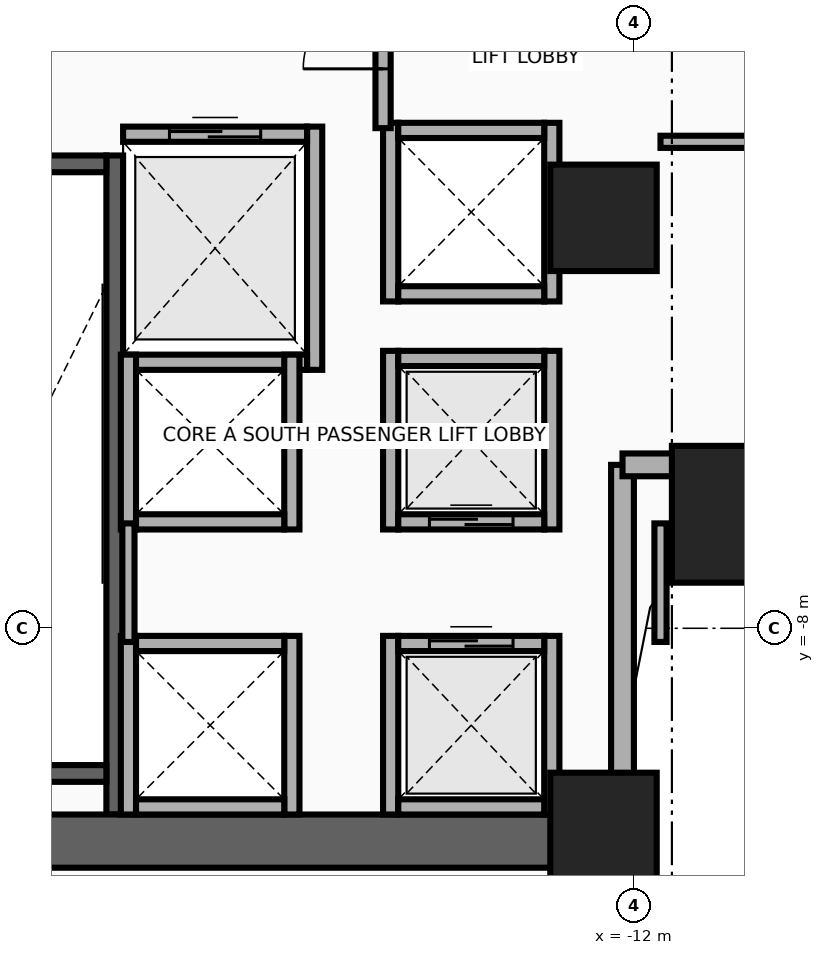
"""IFC4 building model, lengths in metres.
Left out: names, types, materials, properties, quantities, classifications, styles, units other than length and angle.
Written with IfcOpenShell. Run it as: python <this file> out.ifc"""

import sys

from ifc_helpers import new_model, si_unit, direction, frame, frame_2d, origin, origin_2d, place, context, subcontext, project, spatial, rectangle, extrude, source, transform, mapped, element, fill, save


model = new_model("IFC4")
c1 = context("Model", 3, precision=1e-05, world=origin(), true_north=direction((0.0, 1.0)))
c2 = subcontext(c1, "Body", "Model", "MODEL_VIEW")
j1 = project(units=[si_unit("LENGTHUNIT", "METRE"), si_unit("PLANEANGLEUNIT", "RADIAN")], contexts=[c1])
p1 = place(None, origin())
s1 = spatial("IfcSite", under=j1, at=p1, CompositionType="ELEMENT")
p2 = place(p1, origin())
s2 = spatial("IfcBuilding", under=s1, at=p2, CompositionType="ELEMENT")
p3 = place(p2, frame((0.0, 0.0, 10.4)))
s3 = spatial("IfcBuildingStorey", under=s2, at=p3, CompositionType="ELEMENT", Elevation=10.4)
p4 = place(p3, frame((-18.83, -10.45, 0.0), z_axis=(0.0, 0.0, 1.0), x_axis=(0.0, 1.0, 0.0)))
e1 = element("IfcWall", 1, at=p4, inside=s3, PredefinedType="SHEAR", context=c2, shape_type="SweptSolid", body=[
    extrude(rectangle(XDim=8.67, YDim=0.22, at=frame_2d((4.335, 0.0))), origin(), (0.0, 0.0, 1.0), 4.92),
])
p5 = place(p3, frame((-22.05, -9.91, 0.0), z_axis=(0.0, 0.0, 1.0), x_axis=(1.0, 0.0, 0.0)))
e2 = element("IfcWall", 2, at=p5, inside=s3, PredefinedType="SHEAR", context=c2, shape_type="SweptSolid", body=[
    extrude(rectangle(XDim=3.11, YDim=0.22, at=frame_2d((1.555, 0.0))), origin(), (0.0, 0.0, 1.0), 4.92),
])
p6 = place(p3, frame((-22.05, -1.89, 0.0), z_axis=(0.0, 0.0, 1.0), x_axis=(1.0, 0.0, 0.0)))
e3 = element("IfcWall", 3, at=p6, inside=s3, PredefinedType="SHEAR", context=c2, shape_type="SweptSolid", body=[
    extrude(rectangle(XDim=3.11, YDim=0.22, at=frame_2d((1.555, 0.0))), origin(), (0.0, 0.0, 1.0), 4.92),
])
p7 = place(p6, frame((1.0, 0.0, 0.0)))
e4 = element("IfcOpeningElement", 4, at=p7, cuts=e3, PredefinedType="OPENING", context=c2, shape_type="SweptSolid", body=[
    extrude(rectangle(XDim=1.1, YDim=2.15, at=frame_2d((0.55, 1.075))), frame((0.0, 0.125, 0.0), z_axis=(0.0, -1.0, 0.0), x_axis=(1.0, 0.0, 0.0)), (0.0, 0.0, 1.0), 0.25),
])
p8 = place(p3, frame((-22.65, -10.8, 0.0), z_axis=(0.0, 0.0, 1.0), x_axis=(1.0, 0.0, 0.0)))
e5 = element("IfcWall", 5, at=p8, inside=s3, PredefinedType="SHEAR", context=c2, shape_type="SweptSolid", body=[
    extrude(rectangle(XDim=10.25, YDim=0.7, at=frame_2d((5.125, 0.0))), origin(), (0.0, 0.0, 1.0), 4.92),
])
m1 = source(origin(), c2, "Body", "SweptSolid", [
    extrude(rectangle(XDim=1.4, YDim=1.4, at=origin_2d()), origin(), (0.0, 0.0, 1.0), 5.2),
])
for number, where, z_axis, x_axis in (
    (6, (-12.4, -10.6, 0.0), (0.0, 0.0, 1.0), (1.0, 0.0, 0.0)),
    (7, (-12.4, -2.6, 0.0), (0.0, 0.0, 1.0), (1.0, 0.0, 0.0)),
):
    element("IfcColumn", number, at=place(p3, frame(where, z_axis=z_axis, x_axis=x_axis)), inside=s3, PredefinedType="COLUMN", context=c2, shape_type="MappedRepresentation", body=[
        mapped(m1, transform((0.0, 0.0, 0.0), x_axis=(1.0, 0.0, 0.0), y_axis=(0.0, 1.0, 0.0), z_axis=(0.0, 0.0, 1.0), scale=1.0)),
    ])
m2 = source(origin(), c2, "Body", "SweptSolid", [
    extrude(rectangle(XDim=1.8, YDim=1.8, at=origin_2d()), origin(), (0.0, 0.0, 1.0), 5.2),
])
p9 = place(p3, frame((-10.6, -6.5, 0.0), z_axis=(0.0, 0.0, 1.0), x_axis=(1.0, 0.0, 0.0)))
e8 = element("IfcColumn", 8, at=p9, inside=s3, PredefinedType="COLUMN", context=c2, shape_type="MappedRepresentation", body=[
    mapped(m2, transform((0.0, 0.0, 0.0), x_axis=(1.0, 0.0, 0.0), y_axis=(0.0, 1.0, 0.0), z_axis=(0.0, 0.0, 1.0), scale=1.0)),
])
p10 = place(p3, frame((-12.15, -22.85, 0.0), z_axis=(0.0, 0.0, 1.0), x_axis=(0.0, 1.0, 0.0)))
e9 = element("IfcWall", 9, at=p10, inside=s3, PredefinedType="SOLIDWALL", context=c2, shape_type="SweptSolid", body=[
    extrude(rectangle(XDim=17.0, YDim=0.3, at=frame_2d((8.5, 0.0))), origin(), (0.0, 0.0, 1.0), 3.957),
])
p11 = place(p3, frame((-12.15, -5.85, 0.0), z_axis=(0.0, 0.0, 1.0), x_axis=(1.0, 0.0, 0.0)))
e10 = element("IfcWall", 10, at=p11, inside=s3, PredefinedType="SOLIDWALL", context=c2, shape_type="SweptSolid", body=[
    extrude(rectangle(XDim=2.63, YDim=0.3, at=frame_2d((1.315, 0.0))), origin(), (0.0, 0.0, 1.0), 4.92),
])
p12 = place(p3, frame((-16.2, -4.6, 0.0), z_axis=(0.0, 0.0, 1.0), x_axis=(0.0, 1.0, 0.0)))
e11 = element("IfcWall", 11, at=p12, inside=s3, PredefinedType="MOVABLE", context=c2, shape_type="SweptSolid", body=[
    extrude(rectangle(XDim=3.2, YDim=0.2, at=frame_2d((1.6, 0.0))), origin(), (0.0, 0.0, 1.0), 4.92),
])
p13 = place(p3, frame((-18.72, -4.5, 0.0), z_axis=(0.0, 0.0, 1.0), x_axis=(1.0, 0.0, 0.0)))
e12 = element("IfcWall", 12, at=p13, inside=s3, PredefinedType="MOVABLE", context=c2, shape_type="SweptSolid", body=[
    extrude(rectangle(XDim=2.42, YDim=0.2, at=frame_2d((1.21, 0.0))), origin(), (0.0, 0.0, 1.0), 4.92),
])
p14 = place(p3, frame((-18.72, -1.5, 0.0), z_axis=(0.0, 0.0, 1.0), x_axis=(1.0, 0.0, 0.0)))
e13 = element("IfcWall", 13, at=p14, inside=s3, PredefinedType="MOVABLE", context=c2, shape_type="SweptSolid", body=[
    extrude(rectangle(XDim=2.42, YDim=0.2, at=frame_2d((1.21, 0.0))), origin(), (0.0, 0.0, 1.0), 4.92),
])
p15 = place(p14, frame((0.61, 0.0, 0.0)))
e14 = element("IfcOpeningElement", 14, at=p15, cuts=e13, PredefinedType="OPENING", context=c2, shape_type="SweptSolid", body=[
    extrude(rectangle(XDim=1.2, YDim=2.1, at=frame_2d((0.6, 1.05))), frame((0.0, 0.115, 0.0), z_axis=(0.0, -1.0, 0.0), x_axis=(1.0, 0.0, 0.0)), (0.0, 0.0, 1.0), 0.23),
])
for number, where, z_axis, x_axis in (
    (15, (-15.2, -10.45, 0.0), (0.0, 0.0, 1.0), (0.0, 1.0, 0.0)),
    (16, (-13.08, -10.45, 0.0), (0.0, 0.0, 1.0), (0.0, 1.0, 0.0)),
):
    element("IfcWall", number, at=place(p3, frame(where, z_axis=z_axis, x_axis=x_axis)), inside=s3, PredefinedType="MOVABLE", context=c2, shape_type="SweptSolid", body=[
        extrude(rectangle(XDim=2.35, YDim=0.2, at=frame_2d((1.175, 0.0))), origin(), (0.0, 0.0, 1.0), 3.957),
    ])
p16 = place(p3, frame((-15.1, -10.35, 0.0), z_axis=(0.0, 0.0, 1.0), x_axis=(1.0, 0.0, 0.0)))
e17 = element("IfcWall", 17, at=p16, inside=s3, PredefinedType="MOVABLE", context=c2, shape_type="SweptSolid", body=[
    extrude(rectangle(XDim=1.92, YDim=0.2, at=frame_2d((0.96, 0.0))), origin(), (0.0, 0.0, 1.0), 3.957),
])
p17 = place(p3, frame((-15.1, -8.2, 0.0), z_axis=(0.0, 0.0, 1.0), x_axis=(1.0, 0.0, 0.0)))
e18 = element("IfcWall", 18, at=p17, inside=s3, PredefinedType="MOVABLE", context=c2, shape_type="SweptSolid", body=[
    extrude(rectangle(XDim=1.92, YDim=0.2, at=frame_2d((0.96, 0.0))), origin(), (0.0, 0.0, 1.0), 4.92),
])
p18 = place(p17, frame((0.41, 0.0, 0.0)))
e19 = element("IfcOpeningElement", 19, at=p18, cuts=e18, PredefinedType="OPENING", context=c2, shape_type="SweptSolid", body=[
    extrude(rectangle(XDim=1.1, YDim=2.1, at=frame_2d((0.55, 1.05))), frame((0.0, 0.115, 0.0), z_axis=(0.0, -1.0, 0.0), x_axis=(1.0, 0.0, 0.0)), (0.0, 0.0, 1.0), 0.23),
])
for number, where, z_axis, x_axis in (
    (20, (-15.2, -6.7, 0.0), (0.0, 0.0, 1.0), (0.0, 1.0, 0.0)),
    (21, (-13.08, -6.7, 0.0), (0.0, 0.0, 1.0), (0.0, 1.0, 0.0)),
):
    element("IfcWall", number, at=place(p3, frame(where, z_axis=z_axis, x_axis=x_axis)), inside=s3, PredefinedType="MOVABLE", context=c2, shape_type="SweptSolid", body=[
        extrude(rectangle(XDim=2.35, YDim=0.2, at=frame_2d((1.175, 0.0))), origin(), (0.0, 0.0, 1.0), 4.92),
    ])
p19 = place(p3, frame((-15.1, -6.6, 0.0), z_axis=(0.0, 0.0, 1.0), x_axis=(1.0, 0.0, 0.0)))
e22 = element("IfcWall", 22, at=p19, inside=s3, PredefinedType="MOVABLE", context=c2, shape_type="SweptSolid", body=[
    extrude(rectangle(XDim=1.92, YDim=0.2, at=frame_2d((0.96, 0.0))), origin(), (0.0, 0.0, 1.0), 4.92),
])
p20 = place(p19, frame((0.41, 0.0, 0.0)))
e23 = element("IfcOpeningElement", 23, at=p20, cuts=e22, PredefinedType="OPENING", context=c2, shape_type="SweptSolid", body=[
    extrude(rectangle(XDim=1.1, YDim=2.1, at=frame_2d((0.55, 1.05))), frame((0.0, 0.115, 0.0), z_axis=(0.0, -1.0, 0.0), x_axis=(1.0, 0.0, 0.0)), (0.0, 0.0, 1.0), 0.23),
])
p21 = place(p3, frame((-15.1, -4.45, 0.0), z_axis=(0.0, 0.0, 1.0), x_axis=(1.0, 0.0, 0.0)))
e24 = element("IfcWall", 24, at=p21, inside=s3, PredefinedType="MOVABLE", context=c2, shape_type="SweptSolid", body=[
    extrude(rectangle(XDim=1.92, YDim=0.2, at=frame_2d((0.96, 0.0))), origin(), (0.0, 0.0, 1.0), 4.92),
])
for number, where, z_axis, x_axis in (
    (25, (-18.65, -10.45, 0.0), (0.0, 0.0, 1.0), (0.0, 1.0, 0.0)),
    (26, (-16.5, -10.45, 0.0), (0.0, 0.0, 1.0), (0.0, 1.0, 0.0)),
):
    element("IfcWall", number, at=place(p3, frame(where, z_axis=z_axis, x_axis=x_axis)), inside=s3, PredefinedType="MOVABLE", context=c2, shape_type="SweptSolid", body=[
        extrude(rectangle(XDim=2.35, YDim=0.2, at=frame_2d((1.175, 0.0))), origin(), (0.0, 0.0, 1.0), 3.957),
    ])
p22 = place(p3, frame((-18.55, -10.35, 0.0), z_axis=(0.0, 0.0, 1.0), x_axis=(1.0, 0.0, 0.0)))
e27 = element("IfcWall", 27, at=p22, inside=s3, PredefinedType="MOVABLE", context=c2, shape_type="SweptSolid", body=[
    extrude(rectangle(XDim=1.95, YDim=0.2, at=frame_2d((0.975, 0.0))), origin(), (0.0, 0.0, 1.0), 3.957),
])
p23 = place(p3, frame((-18.55, -8.2, 0.0), z_axis=(0.0, 0.0, 1.0), x_axis=(1.0, 0.0, 0.0)))
e28 = element("IfcWall", 28, at=p23, inside=s3, PredefinedType="MOVABLE", context=c2, shape_type="SweptSolid", body=[
    extrude(rectangle(XDim=1.95, YDim=0.2, at=frame_2d((0.975, 0.0))), origin(), (0.0, 0.0, 1.0), 4.92),
])
for number, where, z_axis, x_axis in (
    (29, (-18.65, -6.7, 0.0), (0.0, 0.0, 1.0), (0.0, 1.0, 0.0)),
    (30, (-16.5, -6.7, 0.0), (0.0, 0.0, 1.0), (0.0, 1.0, 0.0)),
):
    element("IfcWall", number, at=place(p3, frame(where, z_axis=z_axis, x_axis=x_axis)), inside=s3, PredefinedType="MOVABLE", context=c2, shape_type="SweptSolid", body=[
        extrude(rectangle(XDim=2.3, YDim=0.2, at=frame_2d((1.15, 0.0))), origin(), (0.0, 0.0, 1.0), 4.92),
    ])
p24 = place(p3, frame((-18.55, -6.6, 0.0), z_axis=(0.0, 0.0, 1.0), x_axis=(1.0, 0.0, 0.0)))
e31 = element("IfcWall", 31, at=p24, inside=s3, PredefinedType="MOVABLE", context=c2, shape_type="SweptSolid", body=[
    extrude(rectangle(XDim=1.95, YDim=0.2, at=frame_2d((0.975, 0.0))), origin(), (0.0, 0.0, 1.0), 4.92),
])
for number, where, z_axis, x_axis in (
    (32, (-15.2, -3.7, 0.0), (0.0, 0.0, 1.0), (0.0, 1.0, 0.0)),
    (33, (-13.08, -3.7, 0.0), (0.0, 0.0, 1.0), (0.0, 1.0, 0.0)),
):
    element("IfcWall", number, at=place(p3, frame(where, z_axis=z_axis, x_axis=x_axis)), inside=s3, PredefinedType="MOVABLE", context=c2, shape_type="SweptSolid", body=[
        extrude(rectangle(XDim=2.35, YDim=0.2, at=frame_2d((1.175, 0.0))), origin(), (0.0, 0.0, 1.0), 4.92),
    ])
for number, where, z_axis, x_axis in (
    (34, (-15.1, -3.6, 0.0), (0.0, 0.0, 1.0), (1.0, 0.0, 0.0)),
    (35, (-15.1, -1.45, 0.0), (0.0, 0.0, 1.0), (1.0, 0.0, 0.0)),
):
    element("IfcWall", number, at=place(p3, frame(where, z_axis=z_axis, x_axis=x_axis)), inside=s3, PredefinedType="MOVABLE", context=c2, shape_type="SweptSolid", body=[
        extrude(rectangle(XDim=1.92, YDim=0.2, at=frame_2d((0.96, 0.0))), origin(), (0.0, 0.0, 1.0), 4.92),
    ])
p25 = place(p3, frame((-15.3, -1.42, 0.0), z_axis=(0.0, 0.0, 1.0), x_axis=(0.0, 1.0, 0.0)))
e36 = element("IfcWall", 36, at=p25, inside=s3, PredefinedType="PARTITIONING", context=c2, shape_type="SweptSolid", body=[
    extrude(rectangle(XDim=2.67, YDim=0.2, at=frame_2d((1.335, 0.0))), origin(), (0.0, 0.0, 1.0), 4.92),
])
p26 = place(p25, frame((0.78, 0.0, 0.0)))
e37 = element("IfcOpeningElement", 37, at=p26, cuts=e36, PredefinedType="OPENING", context=c2, shape_type="SweptSolid", body=[
    extrude(rectangle(XDim=1.05, YDim=2.15, at=frame_2d((0.525, 1.075))), frame((0.0, 0.115, 0.0), z_axis=(0.0, -1.0, 0.0), x_axis=(1.0, 0.0, 0.0)), (0.0, 0.0, 1.0), 0.23),
])
p27 = place(p3, frame((-18.65, -8.18, 0.0), z_axis=(0.0, 0.0, 1.0), x_axis=(0.0, 1.0, 0.0)))
e38 = element("IfcWall", 38, at=p27, inside=s3, PredefinedType="PARTITIONING", context=c2, shape_type="SweptSolid", body=[
    extrude(rectangle(XDim=1.56, YDim=0.16, at=frame_2d((0.78, 0.0))), origin(), (0.0, 0.0, 1.0), 4.92),
])
p28 = place(p3, frame((-11.65, -8.18, 0.0), z_axis=(0.0, 0.0, 1.0), x_axis=(0.0, 1.0, 0.0)))
e39 = element("IfcWall", 39, at=p28, inside=s3, PredefinedType="PARTITIONING", context=c2, shape_type="SweptSolid", body=[
    extrude(rectangle(XDim=1.56, YDim=0.16, at=frame_2d((0.78, 0.0))), origin(), (0.0, 0.0, 1.0), 3.957),
])
p29 = place(p3, frame((-11.65, -1.6, 0.0), z_axis=(0.0, 0.0, 1.0), x_axis=(1.0, 0.0, 0.0)))
e40 = element("IfcWall", 40, at=p29, inside=s3, PredefinedType="PARTITIONING", context=c2, shape_type="SweptSolid", body=[
    extrude(rectangle(XDim=1.85, YDim=0.16, at=frame_2d((0.925, 0.0))), origin(), (0.0, 0.0, 1.0), 4.92),
])
p30 = place(p15, origin())
e41 = element("IfcDoor", 41, at=p30, inside=s3, OperationType="DOUBLE_DOOR_SLIDING", PredefinedType="DOOR", context=c2, shape_type="SweptSolid", body=[
    extrude(rectangle(XDim=1.2, YDim=2.1, at=frame_2d((0.6, 1.05))), frame((0.0, 0.025, 0.0), z_axis=(0.0, -1.0, 0.0), x_axis=(1.0, 0.0, 0.0)), (0.0, 0.0, 1.0), 0.05),
])
fill(e14, e41)
p31 = place(p18, origin())
e42 = element("IfcDoor", 42, at=p31, inside=s3, OperationType="DOUBLE_DOOR_SLIDING", PredefinedType="DOOR", context=c2, shape_type="SweptSolid", body=[
    extrude(rectangle(XDim=1.1, YDim=2.1, at=frame_2d((0.55, 1.05))), frame((0.0, 0.025, 0.0), z_axis=(0.0, -1.0, 0.0), x_axis=(1.0, 0.0, 0.0)), (0.0, 0.0, 1.0), 0.05),
])
fill(e19, e42)
p32 = place(p20, origin())
e43 = element("IfcDoor", 43, at=p32, inside=s3, OperationType="DOUBLE_DOOR_SLIDING", PredefinedType="DOOR", context=c2, shape_type="SweptSolid", body=[
    extrude(rectangle(XDim=1.1, YDim=2.1, at=frame_2d((0.55, 1.05))), frame((0.0, 0.025, 0.0), z_axis=(0.0, -1.0, 0.0), x_axis=(1.0, 0.0, 0.0)), (0.0, 0.0, 1.0), 0.05),
])
fill(e23, e43)
p33 = place(p26, origin())
e44 = element("IfcDoor", 44, at=p33, inside=s3, OperationType="SINGLE_SWING_RIGHT", PredefinedType="DOOR", context=c2, shape_type="SweptSolid", body=[
    extrude(rectangle(XDim=1.05, YDim=2.15, at=frame_2d((0.525, 1.075))), frame((0.0, 0.025, 0.0), z_axis=(0.0, -1.0, 0.0), x_axis=(1.0, 0.0, 0.0)), (0.0, 0.0, 1.0), 0.05),
])
fill(e37, e44)
save(model, sys.argv[1])
